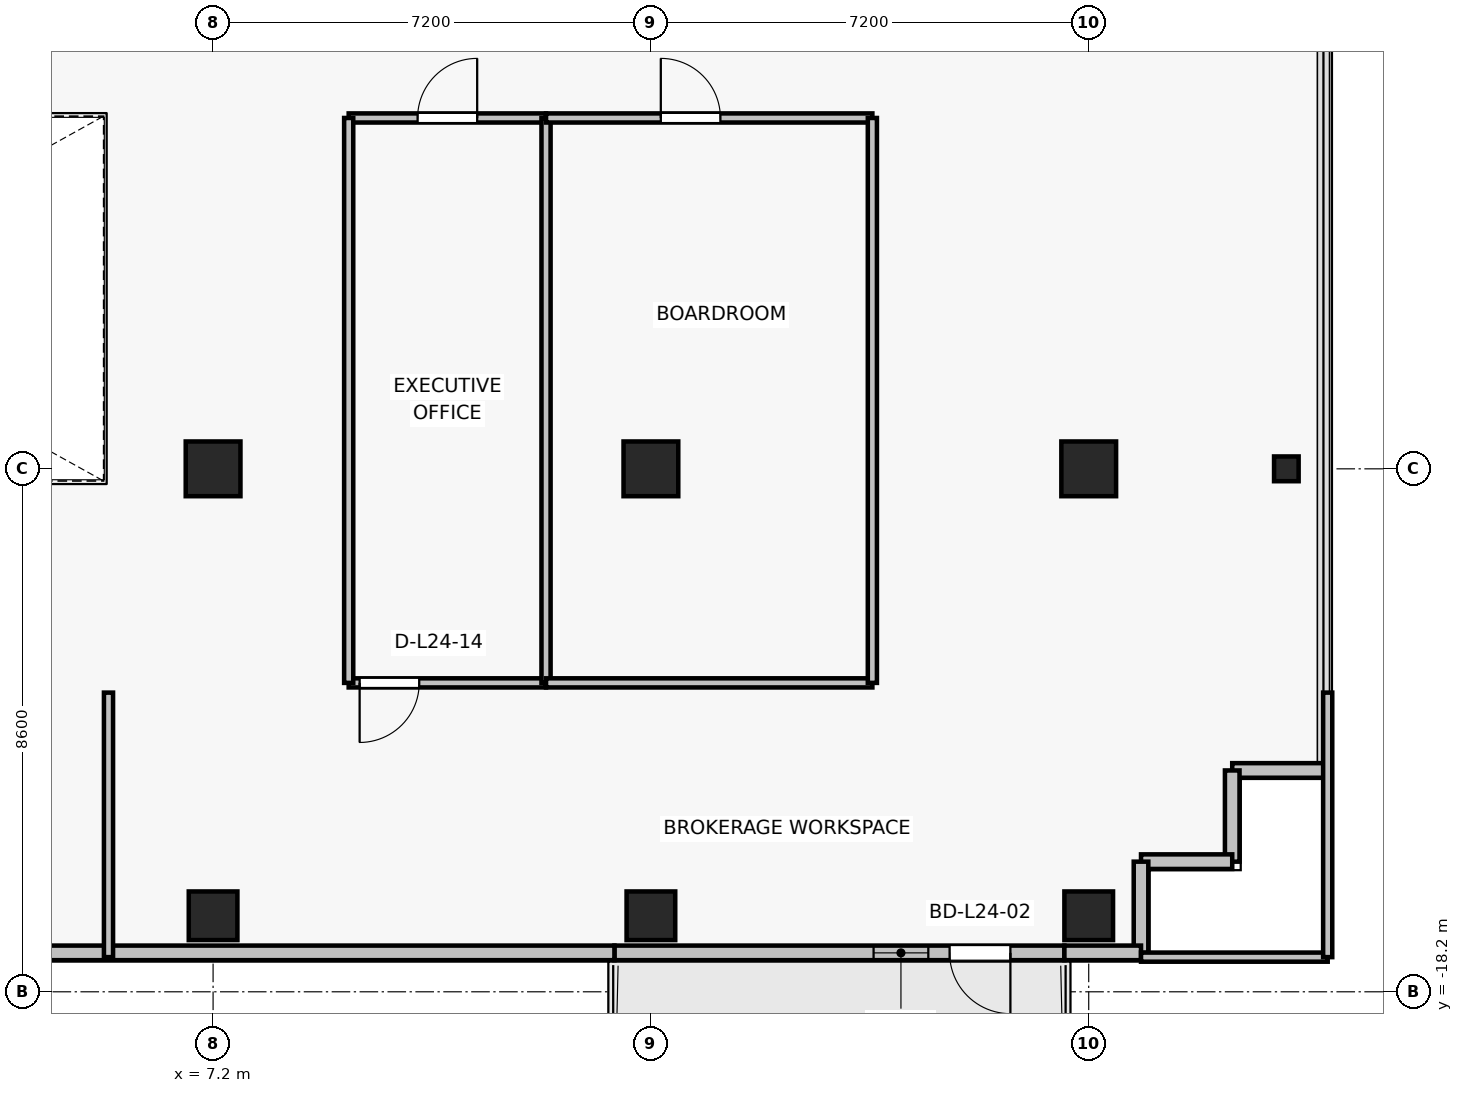
"""IFC4 building model, lengths in metres.
Left out: names, types, materials, properties, quantities, classifications, styles, units other than length and angle.
Written with IfcOpenShell. Run it as: python <this file> out.ifc"""

import sys

from ifc_helpers import new_model, si_unit, direction, frame, frame_2d, origin, origin_2d, place, context, subcontext, project, spatial, rectangle, i_section, extrude, source, transform, mapped, element, fill, save


model = new_model("IFC4")
c1 = context("Model", 3, precision=1e-05, world=origin(), true_north=direction((0.0, 1.0)))
c2 = subcontext(c1, "Body", "Model", "MODEL_VIEW")
j1 = project(units=[si_unit("LENGTHUNIT", "METRE"), si_unit("PLANEANGLEUNIT", "RADIAN")], contexts=[c1])
p1 = place(None, origin())
s1 = spatial("IfcSite", under=j1, at=p1, CompositionType="ELEMENT")
p2 = place(p1, origin())
s2 = spatial("IfcBuilding", under=s1, at=p2, CompositionType="ELEMENT")
p3 = place(p2, frame((0.0, 0.0, 90.1)))
s3 = spatial("IfcBuildingStorey", under=s2, at=p3, CompositionType="ELEMENT", Elevation=90.1)
for number, where, z_axis, x_axis in (
    (1, (7.2, -9.6, 0.0), (0.0, 0.0, 1.0), (1.0, 0.0, 0.0)),
    (2, (14.4, -9.6, 0.0), (0.0, 0.0, 1.0), (1.0, 0.0, 0.0)),
    (3, (21.6, -9.6, 0.0), (0.0, 0.0, 1.0), (1.0, 0.0, 0.0)),
):
    element("IfcColumn", number, at=place(p3, frame(where, z_axis=z_axis, x_axis=x_axis)), inside=s3, PredefinedType="COLUMN", context=c2, shape_type="SweptSolid", body=[
        extrude(rectangle(XDim=0.9, YDim=0.9, at=origin_2d()), origin(), (0.0, 0.0, 1.0), 3.3),
    ])
for number, where, z_axis, x_axis in (
    (4, (7.2, -16.95, 0.0), (0.0, 0.0, 1.0), (1.0, 0.0, 0.0)),
    (5, (14.4, -16.95, 0.0), (0.0, 0.0, 1.0), (1.0, 0.0, 0.0)),
    (6, (21.6, -16.95, 0.0), (0.0, 0.0, 1.0), (1.0, 0.0, 0.0)),
):
    element("IfcColumn", number, at=place(p3, frame(where, z_axis=z_axis, x_axis=x_axis)), inside=s3, PredefinedType="COLUMN", context=c2, shape_type="SweptSolid", body=[
        extrude(rectangle(XDim=0.8, YDim=0.8, at=origin_2d()), origin(), (0.0, 0.0, 1.0), 3.3),
    ])
p4 = place(p3, frame((24.85, -9.6, 0.0), z_axis=(0.0, 0.0, 1.0), x_axis=(1.0, 0.0, 0.0)))
e7 = element("IfcColumn", 7, at=p4, inside=s3, PredefinedType="COLUMN", context=c2, shape_type="SweptSolid", body=[
    extrude(i_section(OverallWidth=0.404, OverallDepth=0.407, WebThickness=0.022, FlangeThickness=0.032, FilletRadius=0.015, at=origin_2d()), origin(), (0.0, 0.0, 1.0), 3.3),
])
p5 = place(p3, frame((21.2, -17.56, 0.0), z_axis=(0.0, 0.0, 1.0), x_axis=(-1.0, 0.0, 0.0)))
e8 = element("IfcWall", 8, at=p5, inside=s3, PredefinedType="SOLIDWALL", context=c2, shape_type="SweptSolid", body=[
    extrude(rectangle(XDim=7.4, YDim=0.24, at=frame_2d((3.7, 0.0))), origin(), (0.0, 0.0, 1.0), 2.665),
])
p6 = place(p5, frame((0.888, 0.0, 0.0)))
e9 = element("IfcOpeningElement", 9, at=p6, cuts=e8, PredefinedType="OPENING", context=c2, shape_type="SweptSolid", body=[
    extrude(rectangle(XDim=1.0, YDim=2.2, at=frame_2d((0.5, 1.1))), frame((0.0, 0.13, 0.0), z_axis=(0.0, -1.0, 0.0), x_axis=(1.0, 0.0, 0.0)), (0.0, 0.0, 1.0), 0.26),
])
p7 = place(p5, frame((2.238, 0.0, 0.85)))
e10 = element("IfcOpeningElement", 10, at=p7, cuts=e8, PredefinedType="OPENING", context=c2, shape_type="SweptSolid", body=[
    extrude(rectangle(XDim=0.9, YDim=1.35, at=frame_2d((0.45, 0.675))), frame((0.0, 0.13, 0.0), z_axis=(0.0, -1.0, 0.0), x_axis=(1.0, 0.0, 0.0)), (0.0, 0.0, 1.0), 0.26),
])
for number, where, z_axis, x_axis in (
    (11, (23.96, -14.56, 0.0), (0.0, 0.0, 1.0), (1.0, 0.0, 0.0)),
    (12, (23.96, -16.06, 0.0), (0.0, 0.0, 1.0), (0.0, 1.0, 0.0)),
    (13, (22.46, -16.06, 0.0), (0.0, 0.0, 1.0), (1.0, 0.0, 0.0)),
):
    element("IfcWall", number, at=place(p3, frame(where, z_axis=z_axis, x_axis=x_axis)), inside=s3, PredefinedType="SOLIDWALL", context=c2, shape_type="SweptSolid", body=[
        extrude(rectangle(XDim=1.5, YDim=0.24, at=frame_2d((0.75, 0.0))), origin(), (0.0, 0.0, 1.0), 3.075),
    ])
p8 = place(p3, frame((22.46, -17.56, 0.0), z_axis=(0.0, 0.0, 1.0), x_axis=(0.0, 1.0, 0.0)))
e14 = element("IfcWall", 14, at=p8, inside=s3, PredefinedType="SOLIDWALL", context=c2, shape_type="SweptSolid", body=[
    extrude(rectangle(XDim=1.5, YDim=0.24, at=frame_2d((0.75, 0.0))), origin(), (0.0, 0.0, 1.0), 2.565),
])
p9 = place(p3, frame((21.2, -17.56, 0.0), z_axis=(0.0, 0.0, 1.0), x_axis=(1.0, 0.0, 0.0)))
e15 = element("IfcWall", 15, at=p9, inside=s3, PredefinedType="SOLIDWALL", context=c2, shape_type="SweptSolid", body=[
    extrude(rectangle(XDim=1.26, YDim=0.24, at=frame_2d((0.63, 0.0))), origin(), (0.0, 0.0, 1.0), 3.075),
])
p10 = place(p3, frame((3.34, -17.56, 0.0), z_axis=(0.0, 0.0, 1.0), x_axis=(1.0, 0.0, 0.0)))
e16 = element("IfcWall", 16, at=p10, inside=s3, PredefinedType="SOLIDWALL", context=c2, shape_type="SweptSolid", body=[
    extrude(rectangle(XDim=10.46, YDim=0.24, at=frame_2d((5.23, 0.0))), origin(), (0.0, 0.0, 1.0), 2.665),
])
p11 = place(p3, frame((12.675, -13.12, 0.0), z_axis=(0.0, 0.0, 1.0), x_axis=(-1.0, 0.0, 0.0)))
e17 = element("IfcWall", 17, at=p11, inside=s3, PredefinedType="PARTITIONING", context=c2, shape_type="SweptSolid", body=[
    extrude(rectangle(XDim=3.245, YDim=0.15, at=frame_2d((1.623, 0.0))), origin(), (0.0, 0.0, 1.0), 2.615),
])
p12 = place(p11, frame((2.085, 0.0, 0.0)))
e18 = element("IfcOpeningElement", 18, at=p12, cuts=e17, PredefinedType="OPENING", context=c2, shape_type="SweptSolid", body=[
    extrude(rectangle(XDim=0.98, YDim=2.15, at=frame_2d((0.49, 1.075))), frame((0.0, 0.085, 0.0), z_axis=(0.0, -1.0, 0.0), x_axis=(1.0, 0.0, 0.0)), (0.0, 0.0, 1.0), 0.17),
])
p13 = place(p3, frame((9.43, -3.83, 0.0), z_axis=(0.0, 0.0, 1.0), x_axis=(1.0, 0.0, 0.0)))
e19 = element("IfcWall", 19, at=p13, inside=s3, PredefinedType="PARTITIONING", context=c2, shape_type="SweptSolid", body=[
    extrude(rectangle(XDim=3.245, YDim=0.15, at=frame_2d((1.623, 0.0))), origin(), (0.0, 0.0, 1.0), 3.075),
])
p14 = place(p13, frame((1.133, 0.0, 0.0)))
e20 = element("IfcOpeningElement", 20, at=p14, cuts=e19, PredefinedType="OPENING", context=c2, shape_type="SweptSolid", body=[
    extrude(rectangle(XDim=0.98, YDim=2.15, at=frame_2d((0.49, 1.075))), frame((0.0, 0.085, 0.0), z_axis=(0.0, -1.0, 0.0), x_axis=(1.0, 0.0, 0.0)), (0.0, 0.0, 1.0), 0.17),
])
for number, where, z_axis, x_axis in (
    (21, (9.43, -13.12, 0.0), (0.0, 0.0, 1.0), (0.0, 1.0, 0.0)),
    (22, (12.675, -3.83, 0.0), (0.0, 0.0, 1.0), (0.0, -1.0, 0.0)),
):
    element("IfcWall", number, at=place(p3, frame(where, z_axis=z_axis, x_axis=x_axis)), inside=s3, PredefinedType="PARTITIONING", context=c2, shape_type="SweptSolid", body=[
        extrude(rectangle(XDim=9.29, YDim=0.15, at=frame_2d((4.645, 0.0))), origin(), (0.0, 0.0, 1.0), 2.515),
    ])
p15 = place(p3, frame((18.042, -13.12, 0.0), z_axis=(0.0, 0.0, 1.0), x_axis=(-1.0, 0.0, 0.0)))
e23 = element("IfcWall", 23, at=p15, inside=s3, PredefinedType="PARTITIONING", context=c2, shape_type="SweptSolid", body=[
    extrude(rectangle(XDim=5.367, YDim=0.15, at=frame_2d((2.683, 0.0))), origin(), (0.0, 0.0, 1.0), 2.515),
])
p16 = place(p3, frame((12.675, -3.83, 0.0), z_axis=(0.0, 0.0, 1.0), x_axis=(1.0, 0.0, 0.0)))
e24 = element("IfcWall", 24, at=p16, inside=s3, PredefinedType="PARTITIONING", context=c2, shape_type="SweptSolid", body=[
    extrude(rectangle(XDim=5.367, YDim=0.15, at=frame_2d((2.683, 0.0))), origin(), (0.0, 0.0, 1.0), 2.515),
])
p17 = place(p16, frame((1.888, 0.0, 0.0)))
e25 = element("IfcOpeningElement", 25, at=p17, cuts=e24, PredefinedType="OPENING", context=c2, shape_type="SweptSolid", body=[
    extrude(rectangle(XDim=0.98, YDim=2.15, at=frame_2d((0.49, 1.075))), frame((0.0, 0.085, 0.0), z_axis=(0.0, -1.0, 0.0), x_axis=(1.0, 0.0, 0.0)), (0.0, 0.0, 1.0), 0.17),
])
p18 = place(p3, frame((18.042, -3.83, 0.0), z_axis=(0.0, 0.0, 1.0), x_axis=(0.0, -1.0, 0.0)))
e26 = element("IfcWall", 26, at=p18, inside=s3, PredefinedType="PARTITIONING", context=c2, shape_type="SweptSolid", body=[
    extrude(rectangle(XDim=9.29, YDim=0.15, at=frame_2d((4.645, 0.0))), origin(), (0.0, 0.0, 1.0), 2.515),
])
p19 = place(p3, frame((25.53, -17.63, 0.0), z_axis=(0.0, 0.0, 1.0), x_axis=(-1.0, 0.0, 0.0)))
e27 = element("IfcWall", 27, at=p19, inside=s3, PredefinedType="PARTITIONING", context=c2, shape_type="SweptSolid", body=[
    extrude(rectangle(XDim=3.07, YDim=0.15, at=frame_2d((1.535, 0.0))), origin(), (0.0, 0.0, 1.0), 2.665),
])
p20 = place(p3, frame((5.48, -17.63, 0.0), z_axis=(0.0, 0.0, 1.0), x_axis=(0.0, 1.0, 0.0)))
e28 = element("IfcWall", 28, at=p20, inside=s3, PredefinedType="PARTITIONING", context=c2, shape_type="SweptSolid", body=[
    extrude(rectangle(XDim=4.35, YDim=0.15, at=frame_2d((2.175, 0.0))), origin(), (0.0, 0.0, 1.0), 2.565),
])
p21 = place(p3, frame((25.53, -13.28, 0.0), z_axis=(0.0, 0.0, 1.0), x_axis=(0.0, -1.0, 0.0)))
e29 = element("IfcWall", 29, at=p21, inside=s3, PredefinedType="PARTITIONING", context=c2, shape_type="SweptSolid", body=[
    extrude(rectangle(XDim=4.35, YDim=0.15, at=frame_2d((2.175, 0.0))), origin(), (0.0, 0.0, 1.0), 3.075),
])
m1 = source(origin(), c2, "Body", "SweptSolid", [
    extrude(rectangle(XDim=1.0, YDim=2.2, at=frame_2d((0.5, 1.1))), frame((0.0, 0.025, 0.0), z_axis=(0.0, -1.0, 0.0), x_axis=(1.0, 0.0, 0.0)), (0.0, 0.0, 1.0), 0.05),
])
p22 = place(p6, origin())
e30 = element("IfcDoor", 30, at=p22, inside=s3, OperationType="SINGLE_SWING_LEFT", PredefinedType="DOOR", context=c2, shape_type="MappedRepresentation", body=[
    mapped(m1, transform((0.0, 0.0, 0.0), x_axis=(1.0, 0.0, 0.0), y_axis=(0.0, 1.0, 0.0), z_axis=(0.0, 0.0, 1.0), scale=1.0)),
])
fill(e9, e30)
m2 = source(origin(), c2, "Body", "SweptSolid", [
    extrude(rectangle(XDim=0.9, YDim=1.35, at=frame_2d((0.45, 0.675))), frame((0.0, 0.03, 0.0), z_axis=(0.0, -1.0, 0.0), x_axis=(1.0, 0.0, 0.0)), (0.0, 0.0, 1.0), 0.06),
])
p23 = place(p7, origin())
e31 = element("IfcWindow", 31, at=p23, inside=s3, PartitioningType="SINGLE_PANEL", PredefinedType="WINDOW", context=c2, shape_type="MappedRepresentation", body=[
    mapped(m2, transform((0.0, 0.0, 0.0), x_axis=(1.0, 0.0, 0.0), y_axis=(0.0, 1.0, 0.0), z_axis=(0.0, 0.0, 1.0), scale=1.0)),
])
fill(e10, e31)
m3 = source(origin(), c2, "Body", "SweptSolid", [
    extrude(rectangle(XDim=0.98, YDim=2.15, at=frame_2d((0.49, 1.075))), frame((0.0, 0.025, 0.0), z_axis=(0.0, -1.0, 0.0), x_axis=(1.0, 0.0, 0.0)), (0.0, 0.0, 1.0), 0.05),
])
p24 = place(p14, origin())
e32 = element("IfcDoor", 32, at=p24, inside=s3, OperationType="SINGLE_SWING_RIGHT", PredefinedType="DOOR", context=c2, shape_type="MappedRepresentation", body=[
    mapped(m3, transform((0.0, 0.0, 0.0), x_axis=(1.0, 0.0, 0.0), y_axis=(0.0, 1.0, 0.0), z_axis=(0.0, 0.0, 1.0), scale=1.0)),
])
fill(e20, e32)
p25 = place(p17, origin())
e33 = element("IfcDoor", 33, at=p25, inside=s3, OperationType="SINGLE_SWING_LEFT", PredefinedType="DOOR", context=c2, shape_type="MappedRepresentation", body=[
    mapped(m3, transform((0.0, 0.0, 0.0), x_axis=(1.0, 0.0, 0.0), y_axis=(0.0, 1.0, 0.0), z_axis=(0.0, 0.0, 1.0), scale=1.0)),
])
fill(e25, e33)
p26 = place(p12, origin())
e34 = element("IfcDoor", 34, at=p26, inside=s3, OperationType="SINGLE_SWING_RIGHT", PredefinedType="DOOR", context=c2, shape_type="MappedRepresentation", body=[
    mapped(m3, transform((0.0, 0.0, 0.0), x_axis=(1.0, 0.0, 0.0), y_axis=(0.0, 1.0, 0.0), z_axis=(0.0, 0.0, 1.0), scale=1.0)),
])
fill(e18, e34)
save(model, sys.argv[1])
